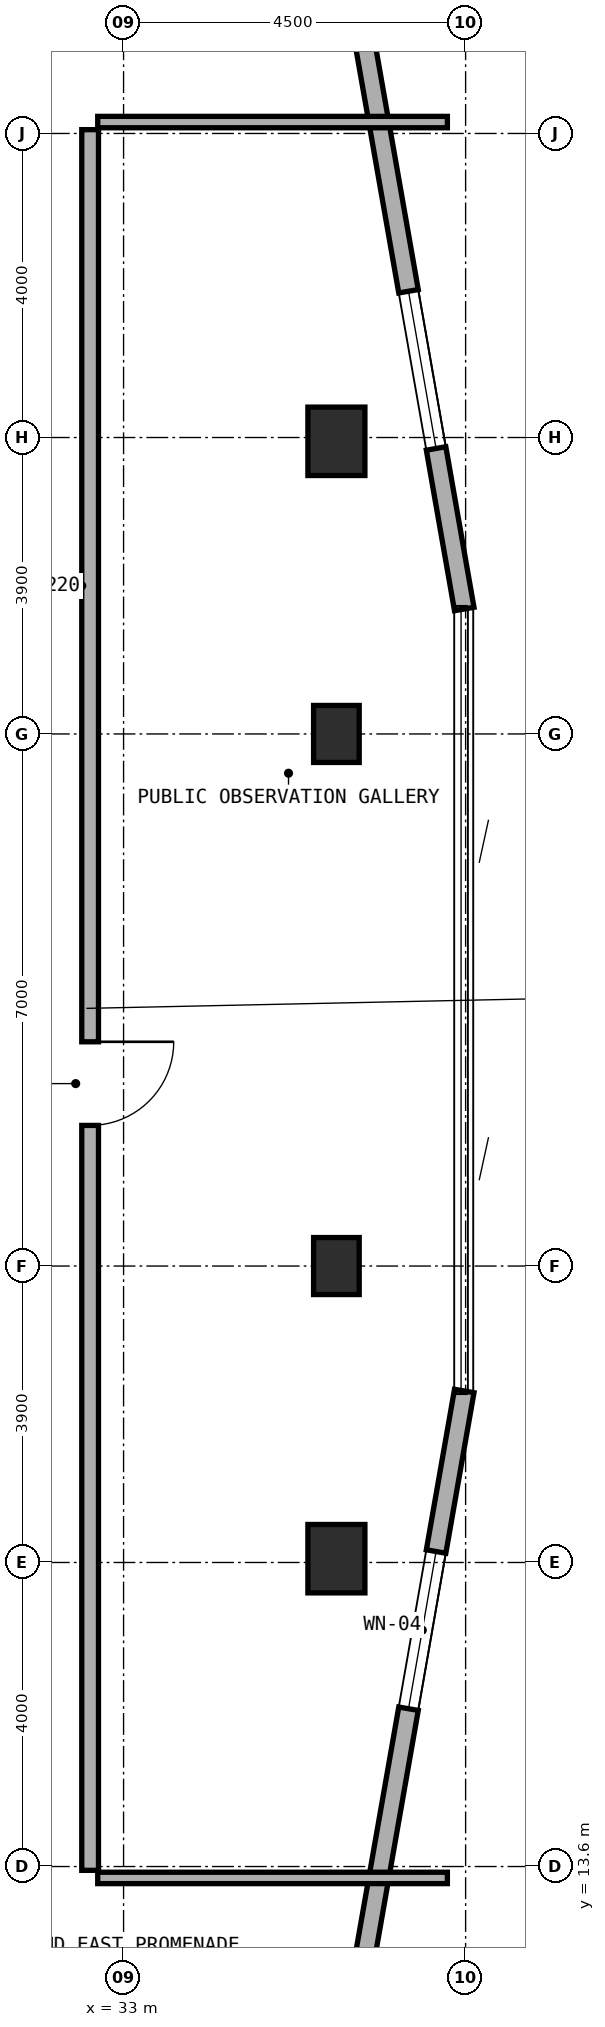
"""IFC4 building model, lengths in metres.
Left out: names, types, materials, properties, quantities, classifications, styles, units other than length and angle.
Written with IfcOpenShell. Run it as: python <this file> out.ifc"""

import sys

from ifc_helpers import new_model, si_unit, direction, frame, frame_2d, origin, origin_2d, place, context, subcontext, project, spatial, rectangle, extrude, element, fill, save


model = new_model("IFC4")
c1 = context("Model", 3, precision=1e-05, world=origin(), true_north=direction((0.0, 1.0)))
c2 = subcontext(c1, "Body", "Model", "MODEL_VIEW")
j1 = project(units=[si_unit("LENGTHUNIT", "METRE"), si_unit("PLANEANGLEUNIT", "RADIAN")], contexts=[c1])
p1 = place(None, origin())
s1 = spatial("IfcSite", under=j1, at=p1, CompositionType="ELEMENT")
p2 = place(p1, origin())
s2 = spatial("IfcBuilding", under=s1, at=p2, CompositionType="ELEMENT")
p3 = place(p2, frame((0.0, 0.0, 268.4)))
s3 = spatial("IfcBuildingStorey", under=s2, at=p3, CompositionType="ELEMENT", Elevation=268.4)
for number, where, z_axis, x_axis in (
    (1, (35.8, 21.5, 0.0), (0.0, 0.0, 1.0), (1.0, 0.0, 0.0)),
    (2, (35.8, 28.5, 0.0), (0.0, 0.0, 1.0), (1.0, 0.0, 0.0)),
):
    element("IfcColumn", number, at=place(p3, frame(where, z_axis=z_axis, x_axis=x_axis)), inside=s3, PredefinedType="COLUMN", context=c2, shape_type="SweptSolid", body=[
        extrude(rectangle(XDim=0.6, YDim=0.75, at=origin_2d()), origin(), (0.0, 0.0, 1.0), 3.6),
    ])
for number, where, z_axis, x_axis in (
    (3, (35.8, 17.65, 0.0), (0.0, 0.0, 1.0), (1.0, 0.0, 0.0)),
    (4, (35.8, 32.35, 0.0), (0.0, 0.0, 1.0), (1.0, 0.0, 0.0)),
):
    element("IfcColumn", number, at=place(p3, frame(where, z_axis=z_axis, x_axis=x_axis)), inside=s3, PredefinedType="COLUMN", context=c2, shape_type="SweptSolid", body=[
        extrude(rectangle(XDim=0.75, YDim=0.9, at=origin_2d()), origin(), (0.0, 0.0, 1.0), 3.6),
    ])
p4 = place(p3, frame((36.071, 11.814, 0.0), z_axis=(0.0, 0.0, 1.0), x_axis=(0.172801004781, 0.98495675679, 0.0)))
e5 = element("IfcWall", 5, at=p4, inside=s3, PredefinedType="STANDARD", context=c2, shape_type="SweptSolid", body=[
    extrude(rectangle(XDim=8.165, YDim=0.26, at=frame_2d((4.083, 0.0))), origin(), (0.0, 0.0, 1.0), 3.32),
])
p5 = place(p4, frame((3.921, 0.0, 0.85)))
e6 = element("IfcOpeningElement", 6, at=p5, cuts=e5, PredefinedType="OPENING", context=c2, shape_type="SweptSolid", body=[
    extrude(rectangle(XDim=2.1, YDim=1.5, at=frame_2d((1.05, 0.75))), frame((0.0, 0.14, 0.0), z_axis=(0.0, -1.0, 0.0), x_axis=(1.0, 0.0, 0.0)), (0.0, 0.0, 1.0), 0.28),
])
p6 = place(p3, frame((37.482, 30.144, 0.0), z_axis=(0.0, 0.0, 1.0), x_axis=(-0.172801004781, 0.98495675679, 0.0)))
e7 = element("IfcWall", 7, at=p6, inside=s3, PredefinedType="STANDARD", context=c2, shape_type="SweptSolid", body=[
    extrude(rectangle(XDim=8.165, YDim=0.26, at=frame_2d((4.083, 0.0))), origin(), (0.0, 0.0, 1.0), 3.32),
])
p7 = place(p6, frame((2.144, 0.0, 0.85)))
e8 = element("IfcOpeningElement", 8, at=p7, cuts=e7, PredefinedType="OPENING", context=c2, shape_type="SweptSolid", body=[
    extrude(rectangle(XDim=2.1, YDim=1.5, at=frame_2d((1.05, 0.75))), frame((0.0, 0.14, 0.0), z_axis=(0.0, -1.0, 0.0), x_axis=(1.0, 0.0, 0.0)), (0.0, 0.0, 1.0), 0.28),
])
for number, where, z_axis, x_axis in (
    (9, (32.66, 13.45, 0.0), (0.0, 0.0, 1.0), (1.0, 0.0, 0.0)),
    (10, (32.66, 36.55, 0.0), (0.0, 0.0, 1.0), (1.0, 0.0, 0.0)),
):
    element("IfcWall", number, at=place(p3, frame(where, z_axis=z_axis, x_axis=x_axis)), inside=s3, PredefinedType="PARTITIONING", context=c2, shape_type="SweptSolid", body=[
        extrude(rectangle(XDim=4.6, YDim=0.15, at=frame_2d((2.3, 0.0))), origin(), (0.0, 0.0, 1.0), 2.795),
    ])
p8 = place(p3, frame((32.56, 13.55, 0.0), z_axis=(0.0, 0.0, 1.0), x_axis=(0.0, 1.0, 0.0)))
e11 = element("IfcWall", 11, at=p8, inside=s3, PredefinedType="SOLIDWALL", context=c2, shape_type="SweptSolid", body=[
    extrude(rectangle(XDim=22.9, YDim=0.22, at=frame_2d((11.45, 0.0))), origin(), (0.0, 0.0, 1.0), 2.795),
])
p9 = place(p8, frame((9.8, 0.0, 0.0)))
e12 = element("IfcOpeningElement", 12, at=p9, cuts=e11, PredefinedType="OPENING", context=c2, shape_type="SweptSolid", body=[
    extrude(rectangle(XDim=1.1, YDim=2.1, at=frame_2d((0.55, 1.05))), frame((0.0, 0.12, 0.0), z_axis=(0.0, -1.0, 0.0), x_axis=(1.0, 0.0, 0.0)), (0.0, 0.0, 1.0), 0.24),
])
p10 = place(p5, origin())
e13 = element("IfcWindow", 13, at=p10, inside=s3, PartitioningType="SINGLE_PANEL", PredefinedType="WINDOW", context=c2, shape_type="SweptSolid", body=[
    extrude(rectangle(XDim=2.1, YDim=1.5, at=frame_2d((1.05, 0.75))), frame((0.0, 0.03, 0.0), z_axis=(0.0, -1.0, 0.0), x_axis=(1.0, 0.0, 0.0)), (0.0, 0.0, 1.0), 0.06),
])
fill(e6, e13)
p11 = place(p7, origin())
e14 = element("IfcWindow", 14, at=p11, inside=s3, PartitioningType="SINGLE_PANEL", PredefinedType="WINDOW", context=c2, shape_type="SweptSolid", body=[
    extrude(rectangle(XDim=2.1, YDim=1.5, at=frame_2d((1.05, 0.75))), frame((0.0, 0.03, 0.0), z_axis=(0.0, -1.0, 0.0), x_axis=(1.0, 0.0, 0.0)), (0.0, 0.0, 1.0), 0.06),
])
fill(e8, e14)
p12 = place(p9, frame((1.1, 0.0, 0.0), z_axis=(0.0, 0.0, 1.0), x_axis=(-1.0, 0.0, 0.0)))
e15 = element("IfcDoor", 15, at=p12, inside=s3, OperationType="SINGLE_SWING_LEFT", PredefinedType="DOOR", context=c2, shape_type="SweptSolid", body=[
    extrude(rectangle(XDim=1.1, YDim=2.1, at=frame_2d((0.55, 1.05))), frame((0.0, 0.025, 0.0), z_axis=(0.0, -1.0, 0.0), x_axis=(1.0, 0.0, 0.0)), (0.0, 0.0, 1.0), 0.05),
])
fill(e12, e15)
save(model, sys.argv[1])
